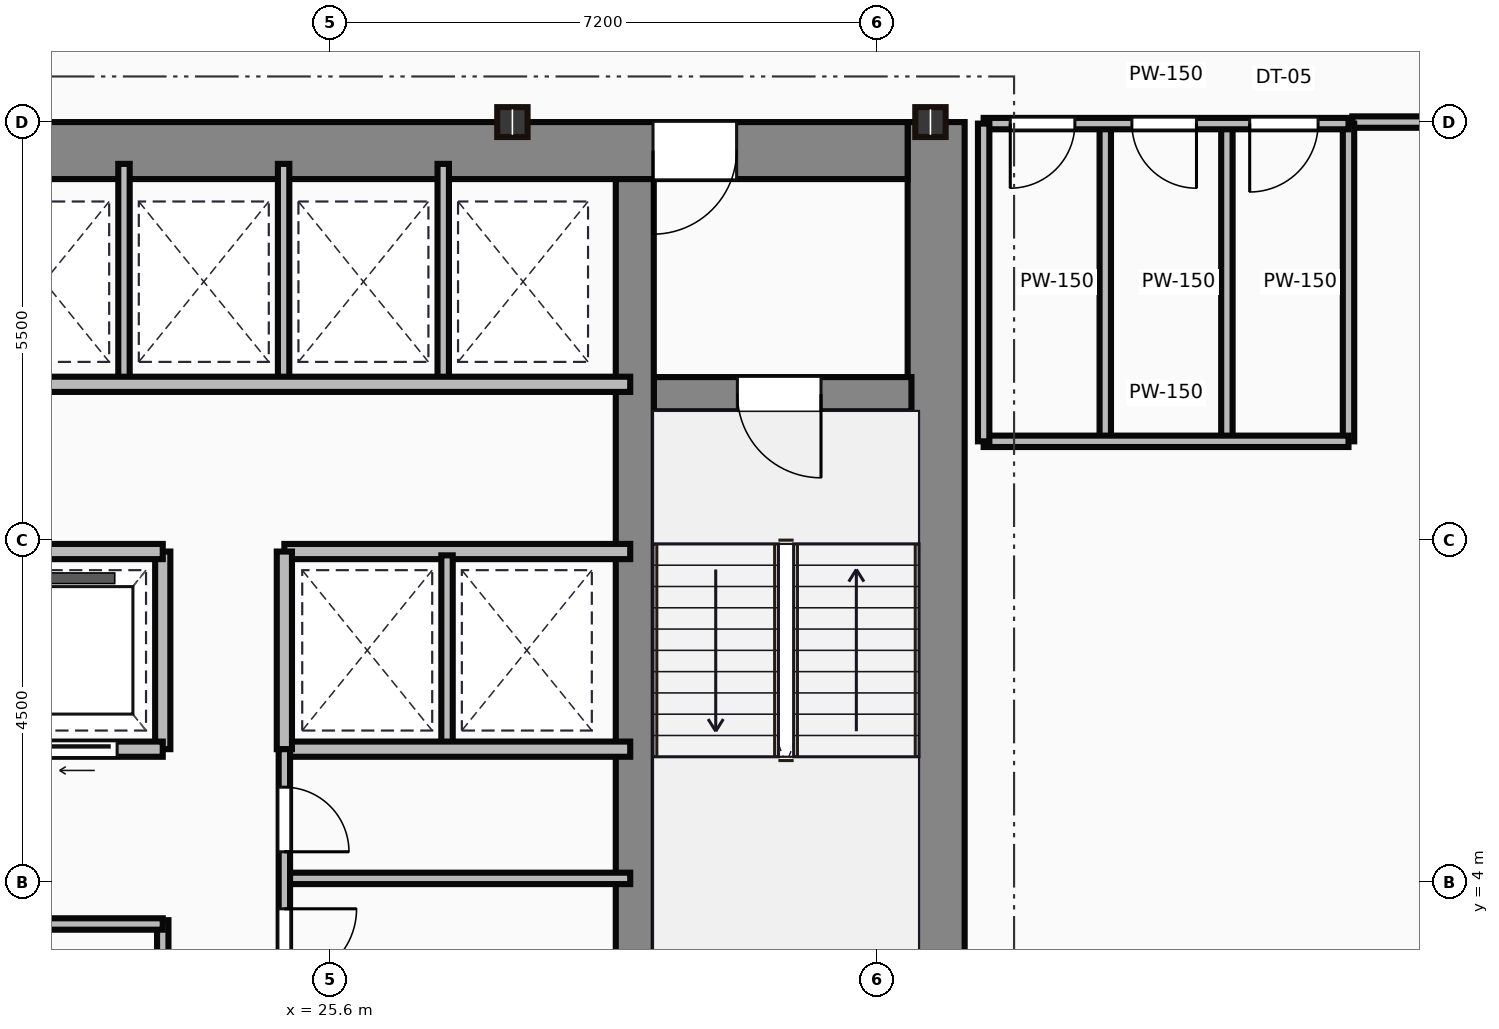
"""IFC4 building model, lengths in metres.
Left out: names, types, materials, properties, quantities, classifications, styles, units other than length and angle.
Written with IfcOpenShell. Run it as: python <this file> out.ifc"""

import sys

from ifc_helpers import new_model, si_unit, direction, frame, frame_2d, origin, origin_2d, place, context, subcontext, project, spatial, rectangle, i_section, extrude, source, transform, mapped, element, fill, save


model = new_model("IFC4")
c1 = context("Model", 3, precision=1e-05, world=origin(), true_north=direction((0.0, 1.0)))
c2 = subcontext(c1, "Body", "Model", "MODEL_VIEW")
j1 = project(units=[si_unit("LENGTHUNIT", "METRE"), si_unit("PLANEANGLEUNIT", "RADIAN")], contexts=[c1])
p1 = place(None, origin())
s1 = spatial("IfcSite", under=j1, at=p1, CompositionType="ELEMENT")
p2 = place(p1, origin())
s2 = spatial("IfcBuilding", under=s1, at=p2, CompositionType="ELEMENT")
p3 = place(p2, frame((0.0, 0.0, 103.25)))
s3 = spatial("IfcBuildingStorey", under=s2, at=p3, CompositionType="ELEMENT", Elevation=103.25)
m1 = source(origin(), c2, "Body", "SweptSolid", [
    extrude(rectangle(XDim=13.1, YDim=0.75, at=frame_2d((6.55, 0.0))), origin(), (0.0, 0.0, 1.0), 3.65),
])
p4 = place(p3, frame((33.575, 0.9, 0.0), z_axis=(0.0, 0.0, 1.0), x_axis=(0.0, 1.0, 0.0)))
e1 = element("IfcWall", 1, at=p4, inside=s3, PredefinedType="SHEAR", context=c2, shape_type="MappedRepresentation", body=[
    mapped(m1, transform((0.0, 0.0, 0.0))),
])
m2 = source(origin(), c2, "Body", "SweptSolid", [
    extrude(rectangle(XDim=12.6, YDim=0.75, at=frame_2d((6.3, 0.0))), origin(), (0.0, 0.0, 1.0), 3.65),
])
p5 = place(p3, frame((20.6, 13.625, 0.0), z_axis=(0.0, 0.0, 1.0), x_axis=(1.0, 0.0, 0.0)))
e2 = element("IfcWall", 2, at=p5, inside=s3, PredefinedType="SHEAR", context=c2, shape_type="MappedRepresentation", body=[
    mapped(m2, transform((0.0, 0.0, 0.0))),
])
p6 = place(p5, frame((9.25, 0.0, 0.0)))
e3 = element("IfcOpeningElement", 3, at=p6, cuts=e2, PredefinedType="OPENING", context=c2, shape_type="SweptSolid", body=[
    extrude(rectangle(XDim=1.1, YDim=2.15, at=frame_2d((0.55, 1.075))), frame((0.0, 0.385, 0.0), z_axis=(0.0, -1.0, 0.0), x_axis=(1.0, 0.0, 0.0)), (0.0, 0.0, 1.0), 0.77),
])
m3 = source(origin(), c2, "Body", "SweptSolid", [
    extrude(rectangle(XDim=12.35, YDim=0.5, at=frame_2d((6.175, 0.0))), origin(), (0.0, 0.0, 1.0), 3.65),
])
p7 = place(p3, frame((29.61, 0.9, 0.0), z_axis=(0.0, 0.0, 1.0), x_axis=(0.0, 1.0, 0.0)))
e4 = element("IfcWall", 4, at=p7, inside=s3, PredefinedType="SHEAR", context=c2, shape_type="MappedRepresentation", body=[
    mapped(m3, transform((0.0, 0.0, 0.0))),
])
m4 = source(origin(), c2, "Body", "SweptSolid", [
    extrude(rectangle(XDim=3.39, YDim=0.45, at=frame_2d((1.695, 0.0))), origin(), (0.0, 0.0, 1.0), 3.65),
])
p8 = place(p3, frame((29.86, 10.42, 0.0), z_axis=(0.0, 0.0, 1.0), x_axis=(1.0, 0.0, 0.0)))
e5 = element("IfcWall", 5, at=p8, inside=s3, PredefinedType="SHEAR", context=c2, shape_type="MappedRepresentation", body=[
    mapped(m4, transform((0.0, 0.0, 0.0))),
])
p9 = place(p8, frame((1.1, 0.0, 0.0)))
e6 = element("IfcOpeningElement", 6, at=p9, cuts=e5, PredefinedType="OPENING", context=c2, shape_type="SweptSolid", body=[
    extrude(rectangle(XDim=1.1, YDim=2.15, at=frame_2d((0.55, 1.075))), frame((0.0, 0.235, 0.0), z_axis=(0.0, -1.0, 0.0), x_axis=(1.0, 0.0, 0.0)), (0.0, 0.0, 1.0), 0.47),
])
m5 = source(origin(), c2, "Body", "SweptSolid", [
    extrude(i_section(OverallWidth=0.399, OverallDepth=0.393, WebThickness=0.023, FlangeThickness=0.037, at=origin_2d()), origin(), (0.0, 0.0, 1.0), 3.65),
])
for number, where, z_axis, x_axis in (
    (7, (28.0, 14.0, 0.0), (0.0, 0.0, 1.0), (1.0, 0.0, 0.0)),
    (8, (33.5, 14.0, 0.0), (0.0, 0.0, 1.0), (1.0, 0.0, 0.0)),
):
    element("IfcColumn", number, at=place(p3, frame(where, z_axis=z_axis, x_axis=x_axis)), inside=s3, PredefinedType="COLUMN", context=c2, shape_type="MappedRepresentation", body=[
        mapped(m5, transform((0.0, 0.0, 0.0))),
    ])
m6 = source(origin(), c2, "Body", "SweptSolid", [
    extrude(rectangle(XDim=10.35, YDim=0.15, at=frame_2d((5.175, 0.0))), origin(), (0.0, 0.0, 1.0), 3.4),
])
p10 = place(p3, frame((13.05, 3.45, 0.0), z_axis=(0.0, 0.0, 1.0), x_axis=(1.0, 0.0, 0.0)))
e9 = element("IfcWall", 9, at=p10, inside=s3, PredefinedType="PARTITIONING", context=c2, shape_type="MappedRepresentation", body=[
    mapped(m6, transform((0.0, 0.0, 0.0))),
])
p11 = place(p10, frame((0.25, 0.0, 0.0)))
e10 = element("IfcOpeningElement", 10, at=p11, cuts=e9, PredefinedType="OPENING", context=c2, shape_type="SweptSolid", body=[
    extrude(rectangle(XDim=0.95, YDim=2.15, at=frame_2d((0.475, 1.075))), frame((0.0, 0.085, 0.0), z_axis=(0.0, -1.0, 0.0), x_axis=(1.0, 0.0, 0.0)), (0.0, 0.0, 1.0), 0.17),
])
p12 = place(p10, frame((6.8, 0.0, 0.0)))
e11 = element("IfcOpeningElement", 11, at=p12, cuts=e9, PredefinedType="OPENING", context=c2, shape_type="SweptSolid", body=[
    extrude(rectangle(XDim=0.95, YDim=2.15, at=frame_2d((0.475, 1.075))), frame((0.0, 0.085, 0.0), z_axis=(0.0, -1.0, 0.0), x_axis=(1.0, 0.0, 0.0)), (0.0, 0.0, 1.0), 0.17),
])
m7 = source(origin(), c2, "Body", "SweptSolid", [
    extrude(rectangle(XDim=2.65, YDim=0.15, at=frame_2d((1.325, 0.0))), origin(), (0.0, 0.0, 1.0), 3.4),
])
p13 = place(p3, frame((23.4, 0.85, 0.0), z_axis=(0.0, 0.0, 1.0), x_axis=(0.0, 1.0, 0.0)))
e12 = element("IfcWall", 12, at=p13, inside=s3, PredefinedType="PARTITIONING", context=c2, shape_type="MappedRepresentation", body=[
    mapped(m7, transform((0.0, 0.0, 0.0))),
])
m8 = source(origin(), c2, "Body", "SweptSolid", [
    extrude(rectangle(XDim=11.85, YDim=0.2, at=frame_2d((5.925, 0.0))), origin(), (0.0, 0.0, 1.0), 3.4),
])
p14 = place(p3, frame((11.55, 5.75, 0.0), z_axis=(0.0, 0.0, 1.0), x_axis=(1.0, 0.0, 0.0)))
e13 = element("IfcWall", 13, at=p14, inside=s3, PredefinedType="PARTITIONING", context=c2, shape_type="MappedRepresentation", body=[
    mapped(m8, transform((0.0, 0.0, 0.0))),
])
p15 = place(p14, frame((0.45, 0.0, 0.0)))
e14 = element("IfcOpeningElement", 14, at=p15, cuts=e13, PredefinedType="OPENING", context=c2, shape_type="SweptSolid", body=[
    extrude(rectangle(XDim=1.05, YDim=2.15, at=frame_2d((0.525, 1.075))), frame((0.0, 0.11, 0.0), z_axis=(0.0, -1.0, 0.0), x_axis=(1.0, 0.0, 0.0)), (0.0, 0.0, 1.0), 0.22),
])
p16 = place(p14, frame((2.4, 0.0, 0.0)))
e15 = element("IfcOpeningElement", 15, at=p16, cuts=e13, PredefinedType="OPENING", context=c2, shape_type="SweptSolid", body=[
    extrude(rectangle(XDim=1.05, YDim=2.15, at=frame_2d((0.525, 1.075))), frame((0.0, 0.11, 0.0), z_axis=(0.0, -1.0, 0.0), x_axis=(1.0, 0.0, 0.0)), (0.0, 0.0, 1.0), 0.22),
])
p17 = place(p14, frame((4.35, 0.0, 0.0)))
e16 = element("IfcOpeningElement", 16, at=p17, cuts=e13, PredefinedType="OPENING", context=c2, shape_type="SweptSolid", body=[
    extrude(rectangle(XDim=1.05, YDim=2.15, at=frame_2d((0.525, 1.075))), frame((0.0, 0.11, 0.0), z_axis=(0.0, -1.0, 0.0), x_axis=(1.0, 0.0, 0.0)), (0.0, 0.0, 1.0), 0.22),
])
p18 = place(p14, frame((6.3, 0.0, 0.0)))
e17 = element("IfcOpeningElement", 17, at=p18, cuts=e13, PredefinedType="OPENING", context=c2, shape_type="SweptSolid", body=[
    extrude(rectangle(XDim=1.05, YDim=2.15, at=frame_2d((0.525, 1.075))), frame((0.0, 0.11, 0.0), z_axis=(0.0, -1.0, 0.0), x_axis=(1.0, 0.0, 0.0)), (0.0, 0.0, 1.0), 0.22),
])
p19 = place(p14, frame((8.25, 0.0, 0.0)))
e18 = element("IfcOpeningElement", 18, at=p19, cuts=e13, PredefinedType="OPENING", context=c2, shape_type="SweptSolid", body=[
    extrude(rectangle(XDim=1.05, YDim=2.15, at=frame_2d((0.525, 1.075))), frame((0.0, 0.11, 0.0), z_axis=(0.0, -1.0, 0.0), x_axis=(1.0, 0.0, 0.0)), (0.0, 0.0, 1.0), 0.22),
])
p20 = place(p14, frame((10.2, 0.0, 0.0)))
e19 = element("IfcOpeningElement", 19, at=p20, cuts=e13, PredefinedType="OPENING", context=c2, shape_type="SweptSolid", body=[
    extrude(rectangle(XDim=1.05, YDim=2.15, at=frame_2d((0.525, 1.075))), frame((0.0, 0.11, 0.0), z_axis=(0.0, -1.0, 0.0), x_axis=(1.0, 0.0, 0.0)), (0.0, 0.0, 1.0), 0.22),
])
p21 = place(p3, frame((11.55, 8.35, 0.0), z_axis=(0.0, 0.0, 1.0), x_axis=(1.0, 0.0, 0.0)))
e20 = element("IfcWall", 20, at=p21, inside=s3, PredefinedType="PARTITIONING", context=c2, shape_type="MappedRepresentation", body=[
    mapped(m8, transform((0.0, 0.0, 0.0))),
])
m9 = source(origin(), c2, "Body", "SweptSolid", [
    extrude(rectangle(XDim=2.6, YDim=0.2, at=frame_2d((1.3, 0.0))), origin(), (0.0, 0.0, 1.0), 3.4),
])
p22 = place(p3, frame((23.4, 5.75, 0.0), z_axis=(0.0, 0.0, 1.0), x_axis=(0.0, 1.0, 0.0)))
e21 = element("IfcWall", 21, at=p22, inside=s3, PredefinedType="PARTITIONING", context=c2, shape_type="MappedRepresentation", body=[
    mapped(m9, transform((0.0, 0.0, 0.0))),
])
m10 = source(origin(), c2, "Body", "SweptSolid", [
    extrude(rectangle(XDim=8.8, YDim=0.2, at=frame_2d((4.4, 0.0))), origin(), (0.0, 0.0, 1.0), 3.4),
])
p23 = place(p3, frame((20.75, 10.55, 0.0), z_axis=(0.0, 0.0, 1.0), x_axis=(1.0, 0.0, 0.0)))
e22 = element("IfcWall", 22, at=p23, inside=s3, PredefinedType="PARTITIONING", context=c2, shape_type="MappedRepresentation", body=[
    mapped(m10, transform((0.0, 0.0, 0.0))),
])
m11 = source(origin(), c2, "Body", "SweptSolid", [
    extrude(rectangle(XDim=2.85, YDim=0.15, at=frame_2d((1.425, 0.0))), origin(), (0.0, 0.0, 1.0), 3.4),
])
for number, where, z_axis, x_axis in (
    (23, (22.89, 10.6, 0.0), (0.0, 0.0, 1.0), (0.0, 1.0, 0.0)),
    (24, (24.99, 10.6, 0.0), (0.0, 0.0, 1.0), (0.0, 1.0, 0.0)),
    (25, (27.09, 10.6, 0.0), (0.0, 0.0, 1.0), (0.0, 1.0, 0.0)),
):
    element("IfcWall", number, at=place(p3, frame(where, z_axis=z_axis, x_axis=x_axis)), inside=s3, PredefinedType="PARTITIONING", context=c2, shape_type="MappedRepresentation", body=[
        mapped(m11, transform((0.0, 0.0, 0.0))),
    ])
m12 = source(origin(), c2, "Body", "SweptSolid", [
    extrude(rectangle(XDim=4.55, YDim=0.2, at=frame_2d((2.275, 0.0))), origin(), (0.0, 0.0, 1.0), 3.4),
])
for number, where, z_axis, x_axis in (
    (26, (25.0, 8.35, 0.0), (0.0, 0.0, 1.0), (1.0, 0.0, 0.0)),
    (27, (25.0, 5.75, 0.0), (0.0, 0.0, 1.0), (1.0, 0.0, 0.0)),
):
    element("IfcWall", number, at=place(p3, frame(where, z_axis=z_axis, x_axis=x_axis)), inside=s3, PredefinedType="PARTITIONING", context=c2, shape_type="MappedRepresentation", body=[
        mapped(m12, transform((0.0, 0.0, 0.0))),
    ])
p24 = place(p3, frame((25.0, 5.75, 0.0), z_axis=(0.0, 0.0, 1.0), x_axis=(0.0, 1.0, 0.0)))
e28 = element("IfcWall", 28, at=p24, inside=s3, PredefinedType="PARTITIONING", context=c2, shape_type="MappedRepresentation", body=[
    mapped(m9, transform((0.0, 0.0, 0.0))),
])
m13 = source(origin(), c2, "Body", "SweptSolid", [
    extrude(rectangle(XDim=2.5, YDim=0.15, at=frame_2d((1.25, 0.0))), origin(), (0.0, 0.0, 1.0), 3.4),
])
p25 = place(p3, frame((27.14, 5.8, 0.0), z_axis=(0.0, 0.0, 1.0), x_axis=(0.0, 1.0, 0.0)))
e29 = element("IfcWall", 29, at=p25, inside=s3, PredefinedType="PARTITIONING", context=c2, shape_type="MappedRepresentation", body=[
    mapped(m13, transform((0.0, 0.0, 0.0))),
])
m14 = source(origin(), c2, "Body", "SweptSolid", [
    extrude(rectangle(XDim=4.9, YDim=0.15, at=frame_2d((2.45, 0.0))), origin(), (0.0, 0.0, 1.0), 3.4),
])
p26 = place(p3, frame((25.0, 0.85, 0.0), z_axis=(0.0, 0.0, 1.0), x_axis=(0.0, 1.0, 0.0)))
e30 = element("IfcWall", 30, at=p26, inside=s3, PredefinedType="PARTITIONING", context=c2, shape_type="MappedRepresentation", body=[
    mapped(m14, transform((0.0, 0.0, 0.0))),
])
p27 = place(p26, frame((1.85, 0.0, 0.0)))
e31 = element("IfcOpeningElement", 31, at=p27, cuts=e30, PredefinedType="OPENING", context=c2, shape_type="SweptSolid", body=[
    extrude(rectangle(XDim=0.95, YDim=2.15, at=frame_2d((0.475, 1.075))), frame((0.0, 0.085, 0.0), z_axis=(0.0, -1.0, 0.0), x_axis=(1.0, 0.0, 0.0)), (0.0, 0.0, 1.0), 0.17),
])
p28 = place(p26, frame((3.55, 0.0, 0.0)))
e32 = element("IfcOpeningElement", 32, at=p28, cuts=e30, PredefinedType="OPENING", context=c2, shape_type="SweptSolid", body=[
    extrude(rectangle(XDim=0.85, YDim=2.15, at=frame_2d((0.425, 1.075))), frame((0.0, 0.085, 0.0), z_axis=(0.0, -1.0, 0.0), x_axis=(1.0, 0.0, 0.0)), (0.0, 0.0, 1.0), 0.17),
])
m15 = source(origin(), c2, "Body", "SweptSolid", [
    extrude(rectangle(XDim=4.55, YDim=0.15, at=frame_2d((2.275, 0.0))), origin(), (0.0, 0.0, 1.0), 3.4),
])
p29 = place(p3, frame((25.0, 4.05, 0.0), z_axis=(0.0, 0.0, 1.0), x_axis=(1.0, 0.0, 0.0)))
e33 = element("IfcWall", 33, at=p29, inside=s3, PredefinedType="PARTITIONING", context=c2, shape_type="MappedRepresentation", body=[
    mapped(m15, transform((0.0, 0.0, 0.0))),
])
m16 = source(origin(), c2, "Body", "SweptSolid", [
    extrude(rectangle(XDim=4.8, YDim=0.15, at=frame_2d((2.4, 0.0))), origin(), (0.0, 0.0, 1.0), 2.702),
])
p30 = place(p3, frame((34.2, 13.98, 0.0), z_axis=(0.0, 0.0, 1.0), x_axis=(1.0, 0.0, 0.0)))
e34 = element("IfcWall", 34, at=p30, inside=s3, PredefinedType="PARTITIONING", context=c2, shape_type="MappedRepresentation", body=[
    mapped(m16, transform((0.0, 0.0, 0.0))),
])
p31 = place(p30, frame((0.35, 0.0, 0.0)))
e35 = element("IfcOpeningElement", 35, at=p31, cuts=e34, PredefinedType="OPENING", context=c2, shape_type="SweptSolid", body=[
    extrude(rectangle(XDim=0.85, YDim=2.1, at=frame_2d((0.425, 1.05))), frame((0.0, 0.085, 0.0), z_axis=(0.0, -1.0, 0.0), x_axis=(1.0, 0.0, 0.0)), (0.0, 0.0, 1.0), 0.17),
])
p32 = place(p30, frame((1.95, 0.0, 0.0)))
e36 = element("IfcOpeningElement", 36, at=p32, cuts=e34, PredefinedType="OPENING", context=c2, shape_type="SweptSolid", body=[
    extrude(rectangle(XDim=0.85, YDim=2.1, at=frame_2d((0.425, 1.05))), frame((0.0, 0.085, 0.0), z_axis=(0.0, -1.0, 0.0), x_axis=(1.0, 0.0, 0.0)), (0.0, 0.0, 1.0), 0.17),
])
p33 = place(p30, frame((3.5, 0.0, 0.0)))
e37 = element("IfcOpeningElement", 37, at=p33, cuts=e34, PredefinedType="OPENING", context=c2, shape_type="SweptSolid", body=[
    extrude(rectangle(XDim=0.9, YDim=2.1, at=frame_2d((0.45, 1.05))), frame((0.0, 0.085, 0.0), z_axis=(0.0, -1.0, 0.0), x_axis=(1.0, 0.0, 0.0)), (0.0, 0.0, 1.0), 0.17),
])
m17 = source(origin(), c2, "Body", "SweptSolid", [
    extrude(rectangle(XDim=4.8, YDim=0.15, at=frame_2d((2.4, 0.0))), origin(), (0.0, 0.0, 1.0), 3.4),
])
p34 = place(p3, frame((34.2, 9.8, 0.0), z_axis=(0.0, 0.0, 1.0), x_axis=(1.0, 0.0, 0.0)))
e38 = element("IfcWall", 38, at=p34, inside=s3, PredefinedType="PARTITIONING", context=c2, shape_type="MappedRepresentation", body=[
    mapped(m17, transform((0.0, 0.0, 0.0))),
])
m18 = source(origin(), c2, "Body", "SweptSolid", [
    extrude(rectangle(XDim=4.18, YDim=0.15, at=frame_2d((2.09, 0.0))), origin(), (0.0, 0.0, 1.0), 3.4),
])
for number, where, z_axis, x_axis in (
    (39, (39.0, 9.8, 0.0), (0.0, 0.0, 1.0), (0.0, 1.0, 0.0)),
    (40, (34.2, 9.8, 0.0), (0.0, 0.0, 1.0), (0.0, 1.0, 0.0)),
    (41, (35.8, 9.8, 0.0), (0.0, 0.0, 1.0), (0.0, 1.0, 0.0)),
    (42, (37.4, 9.8, 0.0), (0.0, 0.0, 1.0), (0.0, 1.0, 0.0)),
):
    element("IfcWall", number, at=place(p3, frame(where, z_axis=z_axis, x_axis=x_axis)), inside=s3, PredefinedType="PARTITIONING", context=c2, shape_type="MappedRepresentation", body=[
        mapped(m18, transform((0.0, 0.0, 0.0))),
    ])
m19 = source(origin(), c2, "Body", "SweptSolid", [
    extrude(rectangle(XDim=1.75, YDim=0.15, at=frame_2d((0.875, 0.0))), origin(), (0.0, 0.0, 1.0), 2.702),
])
p35 = place(p3, frame((40.8, 14.0, 0.0), z_axis=(0.0, 0.0, 1.0), x_axis=(-1.0, 0.0, 0.0)))
e43 = element("IfcWall", 43, at=p35, inside=s3, PredefinedType="PARTITIONING", context=c2, shape_type="MappedRepresentation", body=[
    mapped(m19, transform((0.0, 0.0, 0.0))),
])
m20 = source(origin(), c2, "Body", "SweptSolid", [
    extrude(rectangle(XDim=1.1, YDim=2.15, at=frame_2d((0.55, 1.075))), frame((0.0, 0.025, 0.0), z_axis=(0.0, -1.0, 0.0), x_axis=(1.0, 0.0, 0.0)), (0.0, 0.0, 1.0), 0.05),
])
p36 = place(p9, frame((1.1, 0.0, 0.0), z_axis=(0.0, 0.0, 1.0), x_axis=(-1.0, 0.0, 0.0)))
e44 = element("IfcDoor", 44, at=p36, inside=s3, OperationType="SINGLE_SWING_RIGHT", PredefinedType="DOOR", context=c2, shape_type="MappedRepresentation", body=[
    mapped(m20, transform((0.0, 0.0, 0.0))),
])
fill(e6, e44)
p37 = place(p6, origin())
e45 = element("IfcDoor", 45, at=p37, inside=s3, OperationType="SINGLE_SWING_LEFT", PredefinedType="DOOR", context=c2, shape_type="MappedRepresentation", body=[
    mapped(m20, transform((0.0, 0.0, 0.0))),
])
fill(e3, e45)
m21 = source(origin(), c2, "Body", "SweptSolid", [
    extrude(rectangle(XDim=1.05, YDim=2.15, at=frame_2d((0.525, 1.075))), frame((0.0, 0.025, 0.0), z_axis=(0.0, -1.0, 0.0), x_axis=(1.0, 0.0, 0.0)), (0.0, 0.0, 1.0), 0.05),
])
p38 = place(p20, frame((1.05, 0.0, 0.0), z_axis=(0.0, 0.0, 1.0), x_axis=(-1.0, 0.0, 0.0)))
e46 = element("IfcDoor", 46, at=p38, inside=s3, OperationType="SLIDING_TO_LEFT", PredefinedType="DOOR", context=c2, shape_type="MappedRepresentation", body=[
    mapped(m21, transform((0.0, 0.0, 0.0))),
])
fill(e19, e46)
m22 = source(origin(), c2, "Body", "SweptSolid", [
    extrude(rectangle(XDim=0.95, YDim=2.15, at=frame_2d((0.475, 1.075))), frame((0.0, 0.025, 0.0), z_axis=(0.0, -1.0, 0.0), x_axis=(1.0, 0.0, 0.0)), (0.0, 0.0, 1.0), 0.05),
])
p39 = place(p27, origin())
e47 = element("IfcDoor", 47, at=p39, inside=s3, OperationType="SINGLE_SWING_RIGHT", PredefinedType="DOOR", context=c2, shape_type="MappedRepresentation", body=[
    mapped(m22, transform((0.0, 0.0, 0.0))),
])
fill(e31, e47)
m23 = source(origin(), c2, "Body", "SweptSolid", [
    extrude(rectangle(XDim=0.85, YDim=2.15, at=frame_2d((0.425, 1.075))), frame((0.0, 0.025, 0.0), z_axis=(0.0, -1.0, 0.0), x_axis=(1.0, 0.0, 0.0)), (0.0, 0.0, 1.0), 0.05),
])
p40 = place(p28, origin())
e48 = element("IfcDoor", 48, at=p40, inside=s3, OperationType="SINGLE_SWING_LEFT", PredefinedType="DOOR", context=c2, shape_type="MappedRepresentation", body=[
    mapped(m23, transform((0.0, 0.0, 0.0))),
])
fill(e32, e48)
m24 = source(origin(), c2, "Body", "SweptSolid", [
    extrude(rectangle(XDim=0.85, YDim=2.1, at=frame_2d((0.425, 1.05))), frame((0.0, 0.025, 0.0), z_axis=(0.0, -1.0, 0.0), x_axis=(1.0, 0.0, 0.0)), (0.0, 0.0, 1.0), 0.05),
])
p41 = place(p31, frame((0.85, 0.0, 0.0), z_axis=(0.0, 0.0, 1.0), x_axis=(-1.0, 0.0, 0.0)))
e49 = element("IfcDoor", 49, at=p41, inside=s3, OperationType="SINGLE_SWING_LEFT", PredefinedType="DOOR", context=c2, shape_type="MappedRepresentation", body=[
    mapped(m24, transform((0.0, 0.0, 0.0))),
])
fill(e35, e49)
p42 = place(p32, frame((0.85, 0.0, 0.0), z_axis=(0.0, 0.0, 1.0), x_axis=(-1.0, 0.0, 0.0)))
e50 = element("IfcDoor", 50, at=p42, inside=s3, OperationType="SINGLE_SWING_RIGHT", PredefinedType="DOOR", context=c2, shape_type="MappedRepresentation", body=[
    mapped(m24, transform((0.0, 0.0, 0.0))),
])
fill(e36, e50)
m25 = source(origin(), c2, "Body", "SweptSolid", [
    extrude(rectangle(XDim=0.9, YDim=2.1, at=frame_2d((0.45, 1.05))), frame((0.0, 0.025, 0.0), z_axis=(0.0, -1.0, 0.0), x_axis=(1.0, 0.0, 0.0)), (0.0, 0.0, 1.0), 0.05),
])
p43 = place(p33, frame((0.9, 0.0, 0.0), z_axis=(0.0, 0.0, 1.0), x_axis=(-1.0, 0.0, 0.0)))
e51 = element("IfcDoor", 51, at=p43, inside=s3, OperationType="SINGLE_SWING_LEFT", PredefinedType="DOOR", context=c2, shape_type="MappedRepresentation", body=[
    mapped(m25, transform((0.0, 0.0, 0.0))),
])
fill(e37, e51)
save(model, sys.argv[1])
